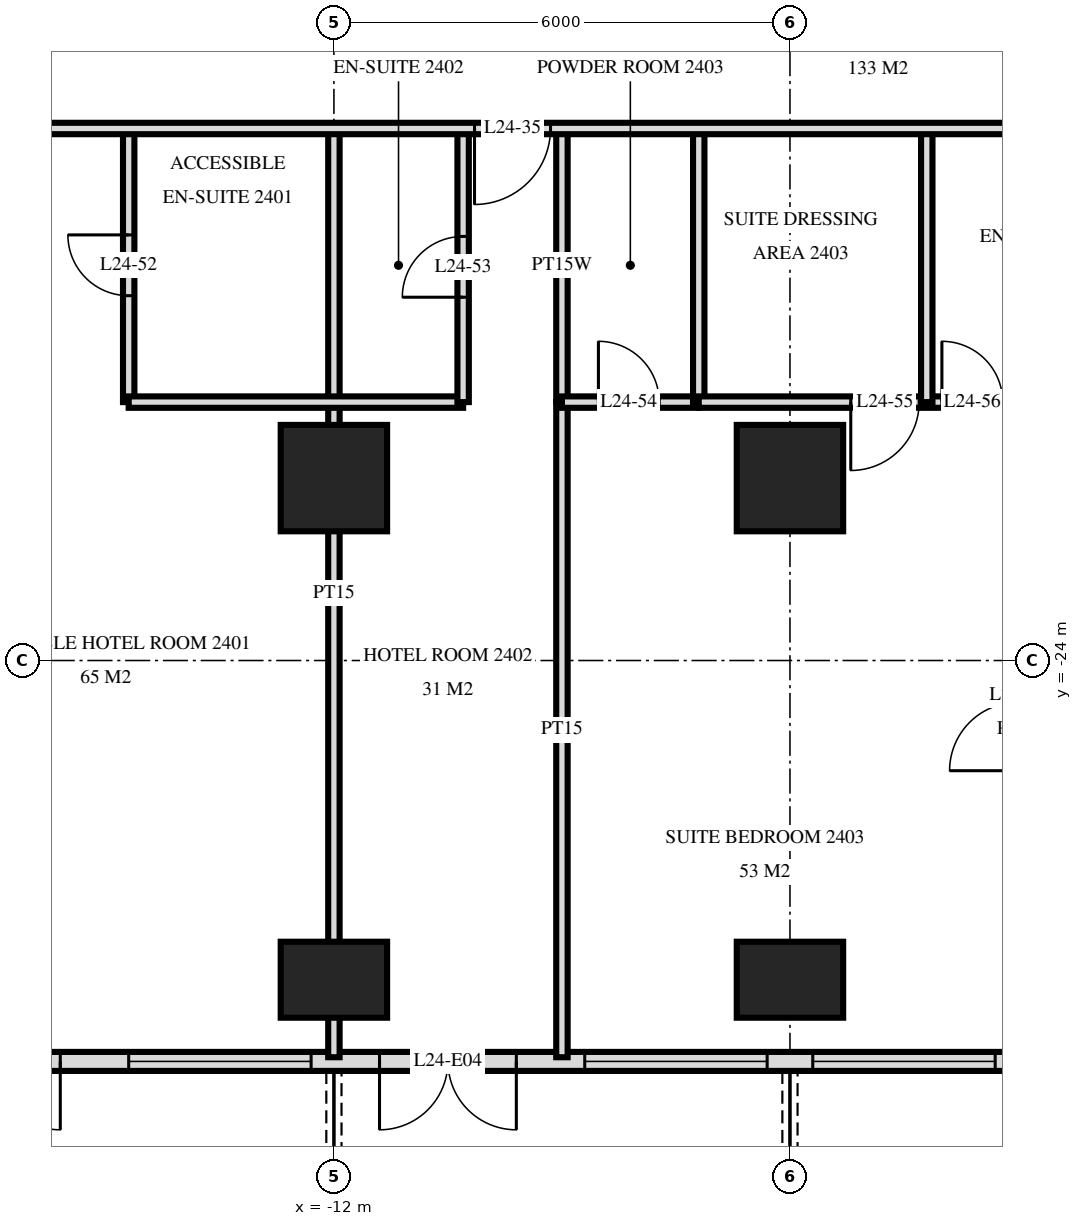
"""IFC4 building model, lengths in metres.
Left out: names, types, materials, properties, quantities, classifications, styles, units other than length and angle.
Written with IfcOpenShell. Run it as: python <this file> out.ifc"""

import sys

from ifc_helpers import new_model, si_unit, direction, frame, frame_2d, origin, origin_2d, place, context, subcontext, project, spatial, rectangle, extrude, element, fill, save


model = new_model("IFC4")
c1 = context("Model", 3, precision=1e-05, world=origin(), true_north=direction((0.0, 1.0)))
c2 = subcontext(c1, "Body", "Model", "MODEL_VIEW")
j1 = project(units=[si_unit("LENGTHUNIT", "METRE"), si_unit("PLANEANGLEUNIT", "RADIAN")], contexts=[c1])
p1 = place(None, origin())
s1 = spatial("IfcSite", under=j1, at=p1, CompositionType="ELEMENT")
p2 = place(p1, origin())
s2 = spatial("IfcBuilding", under=s1, at=p2, CompositionType="ELEMENT")
p3 = place(p2, frame((0.0, 0.0, 96.0)))
s3 = spatial("IfcBuildingStorey", under=s2, at=p3, CompositionType="ELEMENT", Elevation=96.0)
p4 = place(p3, frame((-12.0, -28.2, 0.0), z_axis=(0.0, 0.0, 1.0), x_axis=(1.0, 0.0, 0.0)))
e1 = element("IfcColumn", 1, at=p4, inside=s3, PredefinedType="COLUMN", context=c2, shape_type="SweptSolid", body=[
    extrude(rectangle(XDim=1.4, YDim=1.0, at=origin_2d()), origin(), (0.0, 0.0, 1.0), 3.6),
])
p5 = place(p3, frame((-12.0, -21.6, 0.0), z_axis=(0.0, 0.0, 1.0), x_axis=(1.0, 0.0, 0.0)))
e2 = element("IfcColumn", 2, at=p5, inside=s3, PredefinedType="COLUMN", context=c2, shape_type="SweptSolid", body=[
    extrude(rectangle(XDim=1.4, YDim=1.4, at=origin_2d()), origin(), (0.0, 0.0, 1.0), 3.6),
])
p6 = place(p3, frame((-6.0, -28.2, 0.0), z_axis=(0.0, 0.0, 1.0), x_axis=(1.0, 0.0, 0.0)))
e3 = element("IfcColumn", 3, at=p6, inside=s3, PredefinedType="COLUMN", context=c2, shape_type="SweptSolid", body=[
    extrude(rectangle(XDim=1.4, YDim=1.0, at=origin_2d()), origin(), (0.0, 0.0, 1.0), 3.6),
])
p7 = place(p3, frame((-6.0, -21.6, 0.0), z_axis=(0.0, 0.0, 1.0), x_axis=(1.0, 0.0, 0.0)))
e4 = element("IfcColumn", 4, at=p7, inside=s3, PredefinedType="COLUMN", context=c2, shape_type="SweptSolid", body=[
    extrude(rectangle(XDim=1.4, YDim=1.4, at=origin_2d()), origin(), (0.0, 0.0, 1.0), 3.6),
])
p8 = place(p3, frame((-28.775, -29.275, 0.0), z_axis=(0.0, 0.0, 1.0), x_axis=(1.0, 0.0, 0.0)))
e5 = element("IfcWall", 5, at=p8, inside=s3, PredefinedType="SOLIDWALL", context=c2, shape_type="SweptSolid", body=[
    extrude(rectangle(XDim=57.551, YDim=0.25, at=frame_2d((28.775, 0.0))), origin(), (0.0, 0.0, 1.0), 3.32),
])
p9 = place(p8, frame((0.575, 0.0, 0.0)))
e6 = element("IfcOpeningElement", 6, at=p9, cuts=e5, PredefinedType="OPENING", context=c2, shape_type="SweptSolid", body=[
    extrude(rectangle(XDim=1.8, YDim=2.4, at=frame_2d((0.9, 1.2))), frame((0.0, 0.135, 0.0), z_axis=(0.0, -1.0, 0.0), x_axis=(1.0, 0.0, 0.0)), (0.0, 0.0, 1.0), 0.27),
])
p10 = place(p8, frame((5.075, 0.0, 0.3)))
e7 = element("IfcOpeningElement", 7, at=p10, cuts=e5, PredefinedType="OPENING", context=c2, shape_type="SweptSolid", body=[
    extrude(rectangle(XDim=2.4, YDim=2.1, at=frame_2d((1.2, 1.05))), frame((0.0, 0.135, 0.0), z_axis=(0.0, -1.0, 0.0), x_axis=(1.0, 0.0, 0.0)), (0.0, 0.0, 1.0), 0.27),
])
p11 = place(p8, frame((8.375, 0.0, 0.0)))
e8 = element("IfcOpeningElement", 8, at=p11, cuts=e5, PredefinedType="OPENING", context=c2, shape_type="SweptSolid", body=[
    extrude(rectangle(XDim=1.8, YDim=2.4, at=frame_2d((0.9, 1.2))), frame((0.0, 0.135, 0.0), z_axis=(0.0, -1.0, 0.0), x_axis=(1.0, 0.0, 0.0)), (0.0, 0.0, 1.0), 0.27),
])
p12 = place(p8, frame((11.375, 0.0, 0.0)))
e9 = element("IfcOpeningElement", 9, at=p12, cuts=e5, PredefinedType="OPENING", context=c2, shape_type="SweptSolid", body=[
    extrude(rectangle(XDim=1.8, YDim=2.4, at=frame_2d((0.9, 1.2))), frame((0.0, 0.135, 0.0), z_axis=(0.0, -1.0, 0.0), x_axis=(1.0, 0.0, 0.0)), (0.0, 0.0, 1.0), 0.27),
])
p13 = place(p8, frame((14.075, 0.0, 0.3)))
e10 = element("IfcOpeningElement", 10, at=p13, cuts=e5, PredefinedType="OPENING", context=c2, shape_type="SweptSolid", body=[
    extrude(rectangle(XDim=2.4, YDim=2.1, at=frame_2d((1.2, 1.05))), frame((0.0, 0.135, 0.0), z_axis=(0.0, -1.0, 0.0), x_axis=(1.0, 0.0, 0.0)), (0.0, 0.0, 1.0), 0.27),
])
p14 = place(p8, frame((17.375, 0.0, 0.0)))
e11 = element("IfcOpeningElement", 11, at=p14, cuts=e5, PredefinedType="OPENING", context=c2, shape_type="SweptSolid", body=[
    extrude(rectangle(XDim=1.8, YDim=2.4, at=frame_2d((0.9, 1.2))), frame((0.0, 0.135, 0.0), z_axis=(0.0, -1.0, 0.0), x_axis=(1.0, 0.0, 0.0)), (0.0, 0.0, 1.0), 0.27),
])
p15 = place(p8, frame((20.075, 0.0, 0.3)))
e12 = element("IfcOpeningElement", 12, at=p15, cuts=e5, PredefinedType="OPENING", context=c2, shape_type="SweptSolid", body=[
    extrude(rectangle(XDim=2.4, YDim=2.1, at=frame_2d((1.2, 1.05))), frame((0.0, 0.135, 0.0), z_axis=(0.0, -1.0, 0.0), x_axis=(1.0, 0.0, 0.0)), (0.0, 0.0, 1.0), 0.27),
])
p16 = place(p8, frame((23.075, 0.0, 0.3)))
e13 = element("IfcOpeningElement", 13, at=p16, cuts=e5, PredefinedType="OPENING", context=c2, shape_type="SweptSolid", body=[
    extrude(rectangle(XDim=2.4, YDim=2.1, at=frame_2d((1.2, 1.05))), frame((0.0, 0.135, 0.0), z_axis=(0.0, -1.0, 0.0), x_axis=(1.0, 0.0, 0.0)), (0.0, 0.0, 1.0), 0.27),
])
p17 = place(p8, frame((26.375, 0.0, 0.0)))
e14 = element("IfcOpeningElement", 14, at=p17, cuts=e5, PredefinedType="OPENING", context=c2, shape_type="SweptSolid", body=[
    extrude(rectangle(XDim=1.8, YDim=2.4, at=frame_2d((0.9, 1.2))), frame((0.0, 0.135, 0.0), z_axis=(0.0, -1.0, 0.0), x_axis=(1.0, 0.0, 0.0)), (0.0, 0.0, 1.0), 0.27),
])
p18 = place(p8, frame((29.375, 0.0, 0.0)))
e15 = element("IfcOpeningElement", 15, at=p18, cuts=e5, PredefinedType="OPENING", context=c2, shape_type="SweptSolid", body=[
    extrude(rectangle(XDim=1.8, YDim=2.4, at=frame_2d((0.9, 1.2))), frame((0.0, 0.135, 0.0), z_axis=(0.0, -1.0, 0.0), x_axis=(1.0, 0.0, 0.0)), (0.0, 0.0, 1.0), 0.27),
])
p19 = place(p8, frame((32.075, 0.0, 0.3)))
e16 = element("IfcOpeningElement", 16, at=p19, cuts=e5, PredefinedType="OPENING", context=c2, shape_type="SweptSolid", body=[
    extrude(rectangle(XDim=2.4, YDim=2.1, at=frame_2d((1.2, 1.05))), frame((0.0, 0.135, 0.0), z_axis=(0.0, -1.0, 0.0), x_axis=(1.0, 0.0, 0.0)), (0.0, 0.0, 1.0), 0.27),
])
p20 = place(p8, frame((35.375, 0.0, 0.0)))
e17 = element("IfcOpeningElement", 17, at=p20, cuts=e5, PredefinedType="OPENING", context=c2, shape_type="SweptSolid", body=[
    extrude(rectangle(XDim=1.8, YDim=2.4, at=frame_2d((0.9, 1.2))), frame((0.0, 0.135, 0.0), z_axis=(0.0, -1.0, 0.0), x_axis=(1.0, 0.0, 0.0)), (0.0, 0.0, 1.0), 0.27),
])
p21 = place(p8, frame((38.075, 0.0, 0.3)))
e18 = element("IfcOpeningElement", 18, at=p21, cuts=e5, PredefinedType="OPENING", context=c2, shape_type="SweptSolid", body=[
    extrude(rectangle(XDim=2.4, YDim=2.1, at=frame_2d((1.2, 1.05))), frame((0.0, 0.135, 0.0), z_axis=(0.0, -1.0, 0.0), x_axis=(1.0, 0.0, 0.0)), (0.0, 0.0, 1.0), 0.27),
])
p22 = place(p8, frame((41.075, 0.0, 0.3)))
e19 = element("IfcOpeningElement", 19, at=p22, cuts=e5, PredefinedType="OPENING", context=c2, shape_type="SweptSolid", body=[
    extrude(rectangle(XDim=2.4, YDim=2.1, at=frame_2d((1.2, 1.05))), frame((0.0, 0.135, 0.0), z_axis=(0.0, -1.0, 0.0), x_axis=(1.0, 0.0, 0.0)), (0.0, 0.0, 1.0), 0.27),
])
p23 = place(p8, frame((44.375, 0.0, 0.0)))
e20 = element("IfcOpeningElement", 20, at=p23, cuts=e5, PredefinedType="OPENING", context=c2, shape_type="SweptSolid", body=[
    extrude(rectangle(XDim=1.8, YDim=2.4, at=frame_2d((0.9, 1.2))), frame((0.0, 0.135, 0.0), z_axis=(0.0, -1.0, 0.0), x_axis=(1.0, 0.0, 0.0)), (0.0, 0.0, 1.0), 0.27),
])
p24 = place(p8, frame((47.075, 0.0, 0.3)))
e21 = element("IfcOpeningElement", 21, at=p24, cuts=e5, PredefinedType="OPENING", context=c2, shape_type="SweptSolid", body=[
    extrude(rectangle(XDim=2.4, YDim=2.1, at=frame_2d((1.2, 1.05))), frame((0.0, 0.135, 0.0), z_axis=(0.0, -1.0, 0.0), x_axis=(1.0, 0.0, 0.0)), (0.0, 0.0, 1.0), 0.27),
])
p25 = place(p8, frame((50.375, 0.0, 0.0)))
e22 = element("IfcOpeningElement", 22, at=p25, cuts=e5, PredefinedType="OPENING", context=c2, shape_type="SweptSolid", body=[
    extrude(rectangle(XDim=1.8, YDim=2.4, at=frame_2d((0.9, 1.2))), frame((0.0, 0.135, 0.0), z_axis=(0.0, -1.0, 0.0), x_axis=(1.0, 0.0, 0.0)), (0.0, 0.0, 1.0), 0.27),
])
p26 = place(p8, frame((53.375, 0.0, 0.0)))
e23 = element("IfcOpeningElement", 23, at=p26, cuts=e5, PredefinedType="OPENING", context=c2, shape_type="SweptSolid", body=[
    extrude(rectangle(XDim=1.8, YDim=2.4, at=frame_2d((0.9, 1.2))), frame((0.0, 0.135, 0.0), z_axis=(0.0, -1.0, 0.0), x_axis=(1.0, 0.0, 0.0)), (0.0, 0.0, 1.0), 0.27),
])
p27 = place(p3, frame((-4.2, -20.6, 0.0), z_axis=(0.0, 0.0, 1.0), x_axis=(0.0, 1.0, 0.0)))
e24 = element("IfcWall", 24, at=p27, inside=s3, PredefinedType="PARTITIONING", context=c2, shape_type="SweptSolid", body=[
    extrude(rectangle(XDim=3.6, YDim=0.15, at=frame_2d((1.8, 0.0))), origin(), (0.0, 0.0, 1.0), 3.32),
])
p28 = place(p3, frame((-7.2, -20.6, 0.0), z_axis=(0.0, 0.0, 1.0), x_axis=(0.0, 1.0, 0.0)))
e25 = element("IfcWall", 25, at=p28, inside=s3, PredefinedType="PLUMBINGWALL", context=c2, shape_type="SweptSolid", body=[
    extrude(rectangle(XDim=3.6, YDim=0.15, at=frame_2d((1.8, 0.0))), origin(), (0.0, 0.0, 1.0), 3.32),
])
p29 = place(p3, frame((-9.0, -29.22, 0.0), z_axis=(0.0, 0.0, 1.0), x_axis=(0.0, 1.0, 0.0)))
e26 = element("IfcWall", 26, at=p29, inside=s3, PredefinedType="PARTITIONING", context=c2, shape_type="SweptSolid", body=[
    extrude(rectangle(XDim=8.62, YDim=0.15, at=frame_2d((4.31, 0.0))), origin(), (0.0, 0.0, 1.0), 3.32),
])
p30 = place(p3, frame((-9.0, -20.6, 0.0), z_axis=(0.0, 0.0, 1.0), x_axis=(0.0, 1.0, 0.0)))
e27 = element("IfcWall", 27, at=p30, inside=s3, PredefinedType="PLUMBINGWALL", context=c2, shape_type="SweptSolid", body=[
    extrude(rectangle(XDim=3.6, YDim=0.15, at=frame_2d((1.8, 0.0))), origin(), (0.0, 0.0, 1.0), 3.32),
])
p31 = place(p3, frame((-10.3, -20.6, 0.0), z_axis=(0.0, 0.0, 1.0), x_axis=(0.0, 1.0, 0.0)))
e28 = element("IfcWall", 28, at=p31, inside=s3, PredefinedType="PARTITIONING", context=c2, shape_type="SweptSolid", body=[
    extrude(rectangle(XDim=3.6, YDim=0.15, at=frame_2d((1.8, 0.0))), origin(), (0.0, 0.0, 1.0), 3.32),
])
p32 = place(p31, frame((1.38, 0.0, 0.0)))
e29 = element("IfcOpeningElement", 29, at=p32, cuts=e28, PredefinedType="OPENING", context=c2, shape_type="SweptSolid", body=[
    extrude(rectangle(XDim=0.8, YDim=2.1, at=frame_2d((0.4, 1.05))), frame((0.0, 0.085, 0.0), z_axis=(0.0, -1.0, 0.0), x_axis=(1.0, 0.0, 0.0)), (0.0, 0.0, 1.0), 0.17),
])
p33 = place(p3, frame((-12.0, -29.22, 0.0), z_axis=(0.0, 0.0, 1.0), x_axis=(0.0, 1.0, 0.0)))
e30 = element("IfcWall", 30, at=p33, inside=s3, PredefinedType="PARTITIONING", context=c2, shape_type="SweptSolid", body=[
    extrude(rectangle(XDim=12.22, YDim=0.15, at=frame_2d((6.11, 0.0))), origin(), (0.0, 0.0, 1.0), 3.32),
])
p34 = place(p3, frame((-14.7, -20.6, 0.0), z_axis=(0.0, 0.0, 1.0), x_axis=(0.0, 1.0, 0.0)))
e31 = element("IfcWall", 31, at=p34, inside=s3, PredefinedType="PARTITIONING", context=c2, shape_type="SweptSolid", body=[
    extrude(rectangle(XDim=3.6, YDim=0.15, at=frame_2d((1.8, 0.0))), origin(), (0.0, 0.0, 1.0), 3.32),
])
p35 = place(p34, frame((1.4, 0.0, 0.0)))
e32 = element("IfcOpeningElement", 32, at=p35, cuts=e31, PredefinedType="OPENING", context=c2, shape_type="SweptSolid", body=[
    extrude(rectangle(XDim=0.8, YDim=2.1, at=frame_2d((0.4, 1.05))), frame((0.0, 0.085, 0.0), z_axis=(0.0, -1.0, 0.0), x_axis=(1.0, 0.0, 0.0)), (0.0, 0.0, 1.0), 0.17),
])
p36 = place(p3, frame((-14.7, -20.6, 0.0), z_axis=(0.0, 0.0, 1.0), x_axis=(1.0, 0.0, 0.0)))
e33 = element("IfcWall", 33, at=p36, inside=s3, PredefinedType="PARTITIONING", context=c2, shape_type="SweptSolid", body=[
    extrude(rectangle(XDim=4.4, YDim=0.15, at=frame_2d((2.2, 0.0))), origin(), (0.0, 0.0, 1.0), 3.32),
])
p37 = place(p3, frame((-7.2, -20.6, 0.0), z_axis=(0.0, 0.0, 1.0), x_axis=(1.0, 0.0, 0.0)))
e34 = element("IfcWall", 34, at=p37, inside=s3, PredefinedType="PARTITIONING", context=c2, shape_type="SweptSolid", body=[
    extrude(rectangle(XDim=7.8, YDim=0.15, at=frame_2d((3.9, 0.0))), origin(), (0.0, 0.0, 1.0), 3.32),
])
p38 = place(p37, frame((2.0, 0.0, 0.0)))
e35 = element("IfcOpeningElement", 35, at=p38, cuts=e34, PredefinedType="OPENING", context=c2, shape_type="SweptSolid", body=[
    extrude(rectangle(XDim=0.9, YDim=2.1, at=frame_2d((0.45, 1.05))), frame((0.0, 0.085, 0.0), z_axis=(0.0, -1.0, 0.0), x_axis=(1.0, 0.0, 0.0)), (0.0, 0.0, 1.0), 0.17),
])
p39 = place(p37, frame((3.199, 0.0, 0.0)))
e36 = element("IfcOpeningElement", 36, at=p39, cuts=e34, PredefinedType="OPENING", context=c2, shape_type="SweptSolid", body=[
    extrude(rectangle(XDim=0.8, YDim=2.1, at=frame_2d((0.4, 1.05))), frame((0.0, 0.085, 0.0), z_axis=(0.0, -1.0, 0.0), x_axis=(1.0, 0.0, 0.0)), (0.0, 0.0, 1.0), 0.17),
])
p40 = place(p3, frame((-9.0, -20.6, 0.0), z_axis=(0.0, 0.0, 1.0), x_axis=(1.0, 0.0, 0.0)))
e37 = element("IfcWall", 37, at=p40, inside=s3, PredefinedType="PLUMBINGWALL", context=c2, shape_type="SweptSolid", body=[
    extrude(rectangle(XDim=1.8, YDim=0.15, at=frame_2d((0.9, 0.0))), origin(), (0.0, 0.0, 1.0), 3.32),
])
p41 = place(p40, frame((0.48, 0.0, 0.0)))
e38 = element("IfcOpeningElement", 38, at=p41, cuts=e37, PredefinedType="OPENING", context=c2, shape_type="SweptSolid", body=[
    extrude(rectangle(XDim=0.8, YDim=2.1, at=frame_2d((0.4, 1.05))), frame((0.0, 0.085, 0.0), z_axis=(0.0, -1.0, 0.0), x_axis=(1.0, 0.0, 0.0)), (0.0, 0.0, 1.0), 0.17),
])
p42 = place(p3, frame((-33.12, -17.0, 0.0), z_axis=(0.0, 0.0, 1.0), x_axis=(1.0, 0.0, 0.0)))
e39 = element("IfcWall", 39, at=p42, inside=s3, PredefinedType="PARTITIONING", context=c2, shape_type="SweptSolid", body=[
    extrude(rectangle(XDim=66.24, YDim=0.15, at=frame_2d((33.12, 0.0))), origin(), (0.0, 0.0, 1.0), 3.32),
])
p43 = place(p42, frame((16.27, 0.0, 0.0)))
e40 = element("IfcOpeningElement", 40, at=p43, cuts=e39, PredefinedType="OPENING", context=c2, shape_type="SweptSolid", body=[
    extrude(rectangle(XDim=1.0, YDim=2.1, at=frame_2d((0.5, 1.05))), frame((0.0, 0.085, 0.0), z_axis=(0.0, -1.0, 0.0), x_axis=(1.0, 0.0, 0.0)), (0.0, 0.0, 1.0), 0.17),
])
p44 = place(p42, frame((22.97, 0.0, 0.0)))
e41 = element("IfcOpeningElement", 41, at=p44, cuts=e39, PredefinedType="OPENING", context=c2, shape_type="SweptSolid", body=[
    extrude(rectangle(XDim=1.0, YDim=2.1, at=frame_2d((0.5, 1.05))), frame((0.0, 0.085, 0.0), z_axis=(0.0, -1.0, 0.0), x_axis=(1.0, 0.0, 0.0)), (0.0, 0.0, 1.0), 0.17),
])
p45 = place(p42, frame((34.42, 0.0, 0.0)))
e42 = element("IfcOpeningElement", 42, at=p45, cuts=e39, PredefinedType="OPENING", context=c2, shape_type="SweptSolid", body=[
    extrude(rectangle(XDim=1.0, YDim=2.1, at=frame_2d((0.5, 1.05))), frame((0.0, 0.085, 0.0), z_axis=(0.0, -1.0, 0.0), x_axis=(1.0, 0.0, 0.0)), (0.0, 0.0, 1.0), 0.17),
])
p46 = place(p42, frame((39.22, 0.0, 0.0)))
e43 = element("IfcOpeningElement", 43, at=p46, cuts=e39, PredefinedType="OPENING", context=c2, shape_type="SweptSolid", body=[
    extrude(rectangle(XDim=1.0, YDim=2.1, at=frame_2d((0.5, 1.05))), frame((0.0, 0.085, 0.0), z_axis=(0.0, -1.0, 0.0), x_axis=(1.0, 0.0, 0.0)), (0.0, 0.0, 1.0), 0.17),
])
p47 = place(p42, frame((42.27, 0.0, 0.0)))
e44 = element("IfcOpeningElement", 44, at=p47, cuts=e39, PredefinedType="OPENING", context=c2, shape_type="SweptSolid", body=[
    extrude(rectangle(XDim=1.0, YDim=2.1, at=frame_2d((0.5, 1.05))), frame((0.0, 0.085, 0.0), z_axis=(0.0, -1.0, 0.0), x_axis=(1.0, 0.0, 0.0)), (0.0, 0.0, 1.0), 0.17),
])
p48 = place(p42, frame((45.82, 0.0, 0.0)))
e45 = element("IfcOpeningElement", 45, at=p48, cuts=e39, PredefinedType="OPENING", context=c2, shape_type="SweptSolid", body=[
    extrude(rectangle(XDim=1.0, YDim=2.1, at=frame_2d((0.5, 1.05))), frame((0.0, 0.085, 0.0), z_axis=(0.0, -1.0, 0.0), x_axis=(1.0, 0.0, 0.0)), (0.0, 0.0, 1.0), 0.17),
])
p49 = place(p42, frame((13.42, 0.0, 0.0)))
e46 = element("IfcOpeningElement", 46, at=p49, cuts=e39, PredefinedType="OPENING", context=c2, shape_type="SweptSolid", body=[
    extrude(rectangle(XDim=1.0, YDim=2.1, at=frame_2d((0.5, 1.05))), frame((0.0, 0.085, 0.0), z_axis=(0.0, -1.0, 0.0), x_axis=(1.0, 0.0, 0.0)), (0.0, 0.0, 1.0), 0.17),
])
p50 = place(p42, frame((54.82, 0.0, 0.0)))
e47 = element("IfcOpeningElement", 47, at=p50, cuts=e39, PredefinedType="OPENING", context=c2, shape_type="SweptSolid", body=[
    extrude(rectangle(XDim=1.0, YDim=2.1, at=frame_2d((0.5, 1.05))), frame((0.0, 0.085, 0.0), z_axis=(0.0, -1.0, 0.0), x_axis=(1.0, 0.0, 0.0)), (0.0, 0.0, 1.0), 0.17),
])
p51 = place(p12, frame((0.9, 0.0, 0.0), z_axis=(0.0, 0.0, 1.0), x_axis=(-1.0, 0.0, 0.0)))
e48 = element("IfcDoor", 48, at=p51, inside=s3, OperationType="DOUBLE_DOOR_SINGLE_SWING", PredefinedType="DOOR", context=c2, shape_type="SweptSolid", body=[
    extrude(rectangle(XDim=1.8, YDim=2.4, at=frame_2d((0.0, 1.2))), frame((0.0, -0.025, 0.0), z_axis=(0.0, 1.0, 0.0), x_axis=(-1.0, 0.0, 0.0)), (0.0, 0.0, 1.0), 0.05),
])
fill(e9, e48)
p52 = place(p13, origin())
e49 = element("IfcWindow", 49, at=p52, inside=s3, PartitioningType="SINGLE_PANEL", PredefinedType="WINDOW", context=c2, shape_type="SweptSolid", body=[
    extrude(rectangle(XDim=2.4, YDim=2.1, at=frame_2d((1.2, 1.05))), frame((0.0, 0.03, 0.0), z_axis=(0.0, -1.0, 0.0), x_axis=(1.0, 0.0, 0.0)), (0.0, 0.0, 1.0), 0.06),
])
fill(e10, e49)
p53 = place(p14, frame((0.9, 0.0, 0.0), z_axis=(0.0, 0.0, 1.0), x_axis=(-1.0, 0.0, 0.0)))
e50 = element("IfcDoor", 50, at=p53, inside=s3, OperationType="DOUBLE_DOOR_SINGLE_SWING", PredefinedType="DOOR", context=c2, shape_type="SweptSolid", body=[
    extrude(rectangle(XDim=1.8, YDim=2.4, at=frame_2d((0.0, 1.2))), frame((0.0, -0.025, 0.0), z_axis=(0.0, 1.0, 0.0), x_axis=(-1.0, 0.0, 0.0)), (0.0, 0.0, 1.0), 0.05),
])
fill(e11, e50)
p54 = place(p15, origin())
e51 = element("IfcWindow", 51, at=p54, inside=s3, PartitioningType="SINGLE_PANEL", PredefinedType="WINDOW", context=c2, shape_type="SweptSolid", body=[
    extrude(rectangle(XDim=2.4, YDim=2.1, at=frame_2d((1.2, 1.05))), frame((0.0, 0.03, 0.0), z_axis=(0.0, -1.0, 0.0), x_axis=(1.0, 0.0, 0.0)), (0.0, 0.0, 1.0), 0.06),
])
fill(e12, e51)
p55 = place(p16, origin())
e52 = element("IfcWindow", 52, at=p55, inside=s3, PartitioningType="SINGLE_PANEL", PredefinedType="WINDOW", context=c2, shape_type="SweptSolid", body=[
    extrude(rectangle(XDim=2.4, YDim=2.1, at=frame_2d((1.2, 1.05))), frame((0.0, 0.03, 0.0), z_axis=(0.0, -1.0, 0.0), x_axis=(1.0, 0.0, 0.0)), (0.0, 0.0, 1.0), 0.06),
])
fill(e13, e52)
p56 = place(p44, frame((0.5, 0.0, 0.0), z_axis=(0.0, 0.0, 1.0), x_axis=(-1.0, 0.0, 0.0)))
e53 = element("IfcDoor", 53, at=p56, inside=s3, OperationType="SINGLE_SWING_LEFT", PredefinedType="DOOR", context=c2, shape_type="SweptSolid", body=[
    extrude(rectangle(XDim=1.0, YDim=2.1, at=frame_2d((0.0, 1.05))), frame((0.0, -0.025, 0.0), z_axis=(0.0, 1.0, 0.0), x_axis=(-1.0, 0.0, 0.0)), (0.0, 0.0, 1.0), 0.05),
])
fill(e41, e53)
p57 = place(p35, origin())
e54 = element("IfcDoor", 54, at=p57, inside=s3, OperationType="SINGLE_SWING_LEFT", PredefinedType="DOOR", context=c2, shape_type="SweptSolid", body=[
    extrude(rectangle(XDim=0.8, YDim=2.1, at=frame_2d((0.4, 1.05))), frame((0.0, 0.025, 0.0), z_axis=(0.0, -1.0, 0.0), x_axis=(1.0, 0.0, 0.0)), (0.0, 0.0, 1.0), 0.05),
])
fill(e32, e54)
p58 = place(p32, origin())
e55 = element("IfcDoor", 55, at=p58, inside=s3, OperationType="SINGLE_SWING_RIGHT", PredefinedType="DOOR", context=c2, shape_type="SweptSolid", body=[
    extrude(rectangle(XDim=0.8, YDim=2.1, at=frame_2d((0.4, 1.05))), frame((0.0, 0.025, 0.0), z_axis=(0.0, -1.0, 0.0), x_axis=(1.0, 0.0, 0.0)), (0.0, 0.0, 1.0), 0.05),
])
fill(e29, e55)
p59 = place(p41, origin())
e56 = element("IfcDoor", 56, at=p59, inside=s3, OperationType="SINGLE_SWING_RIGHT", PredefinedType="DOOR", context=c2, shape_type="SweptSolid", body=[
    extrude(rectangle(XDim=0.8, YDim=2.1, at=frame_2d((0.4, 1.05))), frame((0.0, 0.025, 0.0), z_axis=(0.0, -1.0, 0.0), x_axis=(1.0, 0.0, 0.0)), (0.0, 0.0, 1.0), 0.05),
])
fill(e38, e56)
p60 = place(p38, frame((0.45, 0.0, 0.0), z_axis=(0.0, 0.0, 1.0), x_axis=(-1.0, 0.0, 0.0)))
e57 = element("IfcDoor", 57, at=p60, inside=s3, OperationType="SINGLE_SWING_LEFT", PredefinedType="DOOR", context=c2, shape_type="SweptSolid", body=[
    extrude(rectangle(XDim=0.9, YDim=2.1, at=frame_2d((0.0, 1.05))), frame((0.0, -0.025, 0.0), z_axis=(0.0, 1.0, 0.0), x_axis=(-1.0, 0.0, 0.0)), (0.0, 0.0, 1.0), 0.05),
])
fill(e35, e57)
p61 = place(p39, origin())
e58 = element("IfcDoor", 58, at=p61, inside=s3, OperationType="SINGLE_SWING_RIGHT", PredefinedType="DOOR", context=c2, shape_type="SweptSolid", body=[
    extrude(rectangle(XDim=0.8, YDim=2.1, at=frame_2d((0.4, 1.05))), frame((0.0, 0.025, 0.0), z_axis=(0.0, -1.0, 0.0), x_axis=(1.0, 0.0, 0.0)), (0.0, 0.0, 1.0), 0.05),
])
fill(e36, e58)
save(model, sys.argv[1])
